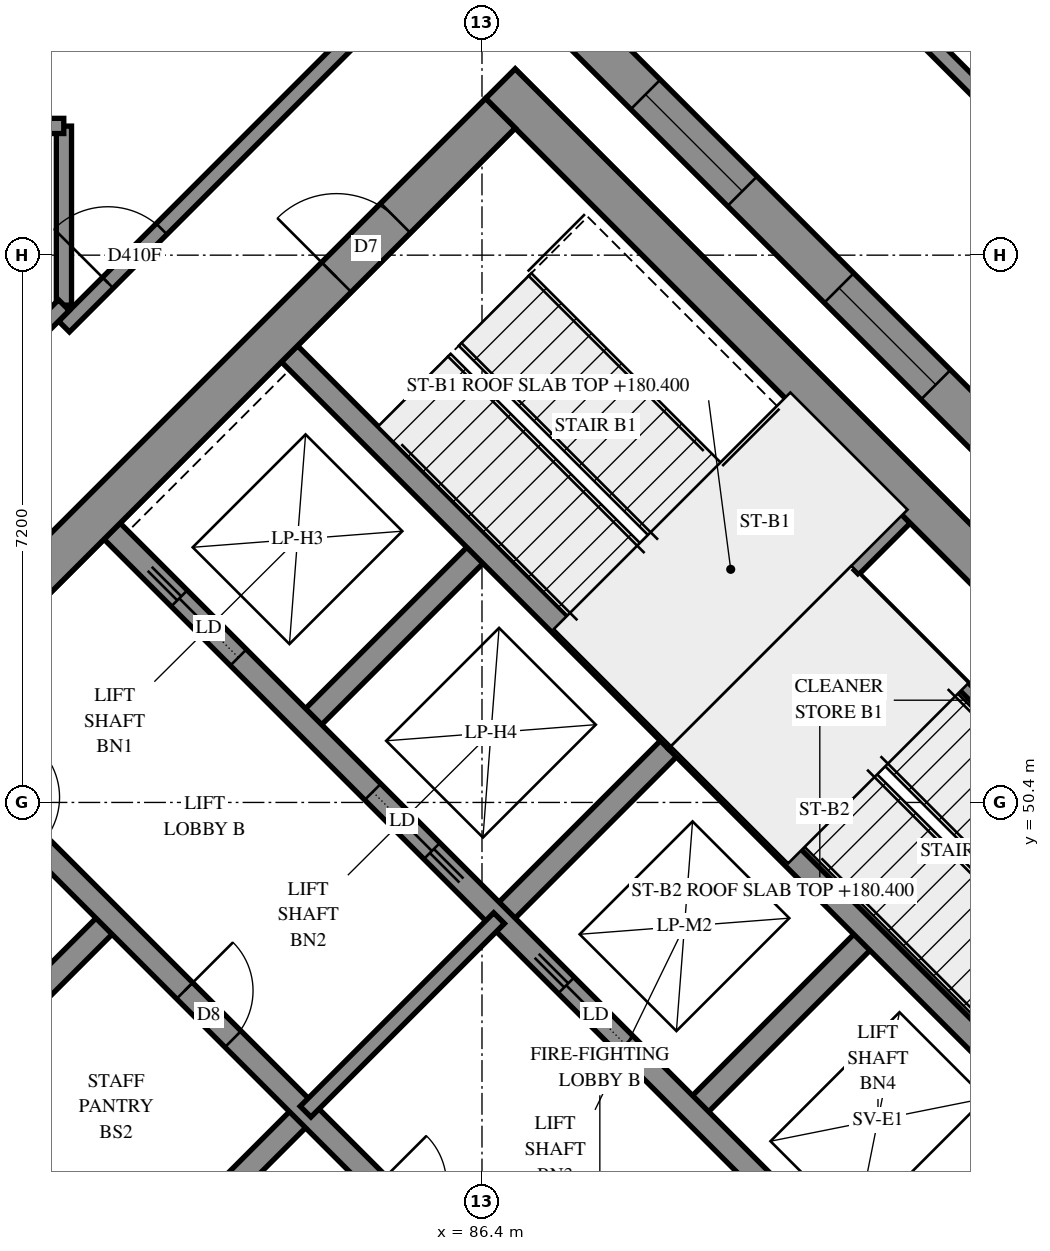
"""IFC4 building model, lengths in metres.
Left out: names, types, materials, properties, quantities, classifications, styles, units other than length and angle.
Written with IfcOpenShell. Run it as: python <this file> out.ifc"""

import sys

from ifc_helpers import new_model, si_unit, direction, frame, frame_2d, origin, place, context, subcontext, project, spatial, polyline, rectangle, outline, extrude, element, fill, save


model = new_model("IFC4")
c1 = context("Model", 3, precision=1e-05, world=origin(), true_north=direction((0.0, 1.0)))
c2 = subcontext(c1, "Body", "Model", "MODEL_VIEW")
j1 = project(units=[si_unit("LENGTHUNIT", "METRE"), si_unit("PLANEANGLEUNIT", "RADIAN")], contexts=[c1])
p1 = place(None, origin())
s1 = spatial("IfcSite", under=j1, at=p1, CompositionType="ELEMENT")
p2 = place(p1, origin())
s2 = spatial("IfcBuilding", under=s1, at=p2, CompositionType="ELEMENT")
p3 = place(p2, frame((0.0, 0.0, 180.4)))
s3 = spatial("IfcBuildingStorey", under=s2, at=p3, CompositionType="ELEMENT", Elevation=180.4)
p4 = place(p3, frame((76.071, 49.284, -0.3), z_axis=(0.0, 0.0, 1.0), x_axis=(0.7071035554, -0.707110007, 0.0)))
e1 = element("IfcWall", 1, at=p4, inside=s3, PredefinedType="SHEAR", context=c2, shape_type="SweptSolid", body=[
    extrude(rectangle(XDim=15.5, YDim=0.55, at=frame_2d((7.75, 0.0))), origin(), (0.0, 0.0, 1.0), 4.3),
])
p5 = place(p3, frame((86.642, 59.855, -0.3), z_axis=(0.0, 0.0, 1.0), x_axis=(0.707110007, -0.7071035554, 0.0)))
e2 = element("IfcWall", 2, at=p5, inside=s3, PredefinedType="SHEAR", context=c2, shape_type="SweptSolid", body=[
    extrude(rectangle(XDim=15.5, YDim=0.55, at=frame_2d((7.75, 0.0))), origin(), (0.0, 0.0, 1.0), 4.3),
])
p6 = place(p5, frame((10.55, 0.0, 0.3)))
e3 = element("IfcOpeningElement", 3, at=p6, cuts=e2, PredefinedType="OPENING", context=c2, shape_type="SweptSolid", body=[
    extrude(rectangle(XDim=0.8, YDim=2.1, at=frame_2d((0.4, 1.05))), frame((0.0, 0.285, 0.0), z_axis=(0.0, -1.0, 0.0), x_axis=(1.0, 0.0, 0.0)), (0.0, 0.0, 1.0), 0.57),
])
p7 = place(p3, frame((76.46, 49.284, -0.3), z_axis=(0.0, 0.0, 1.0), x_axis=(0.7071067812, 0.7071067812, 0.0)))
e4 = element("IfcWall", 4, at=p7, inside=s3, PredefinedType="SHEAR", context=c2, shape_type="SweptSolid", body=[
    extrude(rectangle(XDim=14.4, YDim=0.55, at=frame_2d((7.2, 0.0))), origin(), (0.0, 0.0, 1.0), 4.3),
])
p8 = place(p7, frame((4.55, 0.0, 0.3)))
e5 = element("IfcOpeningElement", 5, at=p8, cuts=e4, PredefinedType="OPENING", context=c2, shape_type="SweptSolid", body=[
    extrude(rectangle(XDim=1.1, YDim=2.1, at=frame_2d((0.55, 1.05))), frame((0.0, 0.285, 0.0), z_axis=(0.0, -1.0, 0.0), x_axis=(1.0, 0.0, 0.0)), (0.0, 0.0, 1.0), 0.57),
])
p9 = place(p7, frame((11.35, 0.0, 0.3)))
e6 = element("IfcOpeningElement", 6, at=p9, cuts=e4, PredefinedType="OPENING", context=c2, shape_type="SweptSolid", body=[
    extrude(rectangle(XDim=1.1, YDim=2.1, at=frame_2d((0.55, 1.05))), frame((0.0, 0.285, 0.0), z_axis=(0.0, -1.0, 0.0), x_axis=(1.0, 0.0, 0.0)), (0.0, 0.0, 1.0), 0.57),
])
p10 = place(p3, frame((87.031, 38.713, -0.3), z_axis=(0.0, 0.0, 1.0), x_axis=(0.707103309, 0.7071102534, 0.0)))
e7 = element("IfcWall", 7, at=p10, inside=s3, PredefinedType="SHEAR", context=c2, shape_type="SweptSolid", body=[
    extrude(rectangle(XDim=14.4, YDim=0.55, at=frame_2d((7.2, 0.0))), origin(), (0.0, 0.0, 1.0), 4.3),
])
p11 = place(p10, frame((4.55, 0.0, 0.3)))
e8 = element("IfcOpeningElement", 8, at=p11, cuts=e7, PredefinedType="OPENING", context=c2, shape_type="SweptSolid", body=[
    extrude(rectangle(XDim=1.1, YDim=2.1, at=frame_2d((0.55, 1.05))), frame((0.0, 0.285, 0.0), z_axis=(0.0, -1.0, 0.0), x_axis=(1.0, 0.0, 0.0)), (0.0, 0.0, 1.0), 0.57),
])
p12 = place(p10, frame((11.35, 0.0, 0.3)))
e9 = element("IfcOpeningElement", 9, at=p12, cuts=e7, PredefinedType="OPENING", context=c2, shape_type="SweptSolid", body=[
    extrude(rectangle(XDim=1.1, YDim=2.1, at=frame_2d((0.55, 1.05))), frame((0.0, 0.285, 0.0), z_axis=(0.0, -1.0, 0.0), x_axis=(1.0, 0.0, 0.0)), (0.0, 0.0, 1.0), 0.57),
])
for number, where, z_axis, x_axis in (
    (10, (79.2, 46.544, 0.0), (0.0, 0.0, 1.0), (0.707, 0.707, 0.0)),
    (11, (84.079, 51.423, 0.0), (0.0, 0.0, 1.0), (0.707, 0.707, 0.0)),
):
    element("IfcWall", number, at=place(p3, frame(where, z_axis=z_axis, x_axis=x_axis)), inside=s3, PredefinedType="SOLIDWALL", context=c2, shape_type="SweptSolid", body=[
        extrude(rectangle(XDim=3.3, YDim=0.3, at=frame_2d((1.65, 0.0))), origin(), (0.0, 0.0, 1.0), 4.7),
    ])
p13 = place(p3, frame((81.746, 43.999, 0.0), z_axis=(0.0, 0.0, 1.0), x_axis=(0.7071067812, 0.7071067812, 0.0)))
e12 = element("IfcWall", 12, at=p13, inside=s3, PredefinedType="SOLIDWALL", context=c2, shape_type="SweptSolid", body=[
    extrude(rectangle(XDim=3.3, YDim=0.3, at=frame_2d((1.65, 0.0))), origin(), (0.0, 0.0, 1.0), 4.7),
])
for number, where, z_axis, x_axis in (
    (13, (86.625, 48.878, 0.0), (0.0, 0.0, 1.0), (0.707, 0.707, 0.0)),
    (14, (89.17, 46.332, 0.0), (0.0, 0.0, 1.0), (0.707, 0.707, 0.0)),
):
    element("IfcWall", number, at=place(p3, frame(where, z_axis=z_axis, x_axis=x_axis)), inside=s3, PredefinedType="SOLIDWALL", context=c2, shape_type="SweptSolid", body=[
        extrude(rectangle(XDim=3.3, YDim=0.3, at=frame_2d((1.65, 0.0))), origin(), (0.0, 0.0, 1.0), 4.7),
    ])
p14 = place(p3, frame((78.988, 51.423, 0.0), z_axis=(0.0, 0.0, 1.0), x_axis=(0.7071067812, -0.7071067812, 0.0)))
e15 = element("IfcWall", 15, at=p14, inside=s3, PredefinedType="SOLIDWALL", context=c2, shape_type="SweptSolid", body=[
    extrude(rectangle(XDim=14.4, YDim=0.3, at=frame_2d((7.2, 0.0))), origin(), (0.0, 0.0, 1.0), 4.7),
])
p15 = place(p14, frame((1.35, 0.0, 0.0)))
e16 = element("IfcOpeningElement", 16, at=p15, cuts=e15, PredefinedType="OPENING", context=c2, shape_type="SweptSolid", body=[
    extrude(rectangle(XDim=0.9, YDim=2.1, at=frame_2d((0.45, 1.05))), frame((0.0, 0.16, 0.0), z_axis=(0.0, -1.0, 0.0), x_axis=(1.0, 0.0, 0.0)), (0.0, 0.0, 1.0), 0.32),
])
p16 = place(p14, frame((4.95, 0.0, 0.0)))
e17 = element("IfcOpeningElement", 17, at=p16, cuts=e15, PredefinedType="OPENING", context=c2, shape_type="SweptSolid", body=[
    extrude(rectangle(XDim=0.9, YDim=2.1, at=frame_2d((0.45, 1.05))), frame((0.0, 0.16, 0.0), z_axis=(0.0, -1.0, 0.0), x_axis=(1.0, 0.0, 0.0)), (0.0, 0.0, 1.0), 0.32),
])
p17 = place(p14, frame((8.55, 0.0, 0.0)))
e18 = element("IfcOpeningElement", 18, at=p17, cuts=e15, PredefinedType="OPENING", context=c2, shape_type="SweptSolid", body=[
    extrude(rectangle(XDim=0.9, YDim=2.1, at=frame_2d((0.45, 1.05))), frame((0.0, 0.16, 0.0), z_axis=(0.0, -1.0, 0.0), x_axis=(1.0, 0.0, 0.0)), (0.0, 0.0, 1.0), 0.32),
])
p18 = place(p14, frame((12.05, 0.0, 0.0)))
e19 = element("IfcOpeningElement", 19, at=p18, cuts=e15, PredefinedType="OPENING", context=c2, shape_type="SweptSolid", body=[
    extrude(rectangle(XDim=1.1, YDim=2.1, at=frame_2d((0.55, 1.05))), frame((0.0, 0.16, 0.0), z_axis=(0.0, -1.0, 0.0), x_axis=(1.0, 0.0, 0.0)), (0.0, 0.0, 1.0), 0.32),
])
p19 = place(p3, frame((81.534, 53.969, 0.0), z_axis=(0.0, 0.0, 1.0), x_axis=(0.707103309, -0.7071102534, 0.0)))
e20 = element("IfcWall", 20, at=p19, inside=s3, PredefinedType="SOLIDWALL", context=c2, shape_type="SweptSolid", body=[
    extrude(rectangle(XDim=14.4, YDim=0.3, at=frame_2d((7.2, 0.0))), origin(), (0.0, 0.0, 1.0), 4.7),
])
p20 = place(p19, frame((1.25, 0.0, 0.0)))
e21 = element("IfcOpeningElement", 21, at=p20, cuts=e20, PredefinedType="OPENING", context=c2, shape_type="SweptSolid", body=[
    extrude(rectangle(XDim=1.1, YDim=2.1, at=frame_2d((0.55, 1.05))), frame((0.0, 0.16, 0.0), z_axis=(0.0, -1.0, 0.0), x_axis=(1.0, 0.0, 0.0)), (0.0, 0.0, 1.0), 0.32),
])
p21 = place(p19, frame((4.85, 0.0, 0.0)))
e22 = element("IfcOpeningElement", 22, at=p21, cuts=e20, PredefinedType="OPENING", context=c2, shape_type="SweptSolid", body=[
    extrude(rectangle(XDim=1.1, YDim=2.1, at=frame_2d((0.55, 1.05))), frame((0.0, 0.16, 0.0), z_axis=(0.0, -1.0, 0.0), x_axis=(1.0, 0.0, 0.0)), (0.0, 0.0, 1.0), 0.32),
])
p22 = place(p19, frame((8.45, 0.0, 0.0)))
e23 = element("IfcOpeningElement", 23, at=p22, cuts=e20, PredefinedType="OPENING", context=c2, shape_type="SweptSolid", body=[
    extrude(rectangle(XDim=1.1, YDim=2.1, at=frame_2d((0.55, 1.05))), frame((0.0, 0.16, 0.0), z_axis=(0.0, -1.0, 0.0), x_axis=(1.0, 0.0, 0.0)), (0.0, 0.0, 1.0), 0.32),
])
p23 = place(p19, frame((12.05, 0.0, 0.0)))
e24 = element("IfcOpeningElement", 24, at=p23, cuts=e20, PredefinedType="OPENING", context=c2, shape_type="SweptSolid", body=[
    extrude(rectangle(XDim=1.1, YDim=2.1, at=frame_2d((0.55, 1.05))), frame((0.0, 0.16, 0.0), z_axis=(0.0, -1.0, 0.0), x_axis=(1.0, 0.0, 0.0)), (0.0, 0.0, 1.0), 0.32),
])
for number, where, z_axis, x_axis in (
    (25, (83.867, 56.302, 0.0), (0.0, 0.0, 1.0), (0.707, -0.707, 0.0)),
    (26, (88.958, 51.211, 0.0), (0.0, 0.0, 1.0), (0.707, -0.707, 0.0)),
):
    element("IfcWall", number, at=place(p3, frame(where, z_axis=z_axis, x_axis=x_axis)), inside=s3, PredefinedType="SOLIDWALL", context=c2, shape_type="SweptSolid", body=[
        extrude(rectangle(XDim=7.2, YDim=0.3, at=frame_2d((3.6, 0.0))), origin(), (0.0, 0.0, 1.0), 4.7),
    ])
p24 = place(p3, frame((88.958, 51.211, 0.0), z_axis=(0.0, 0.0, 1.0), x_axis=(0.7071067812, 0.7071067812, 0.0)))
e27 = element("IfcWall", 27, at=p24, inside=s3, PredefinedType="SOLIDWALL", context=c2, shape_type="SweptSolid", body=[
    extrude(rectangle(XDim=4.2, YDim=0.3, at=frame_2d((2.1, 0.0))), origin(), (0.0, 0.0, 1.0), 4.7),
])
p25 = place(p3, frame((100.024, 48.241, 0.0), z_axis=(0.0, 0.0, 1.0), x_axis=(-0.7071067812, 0.7071067812, 0.0)))
e28 = element("IfcWall", 28, at=p25, inside=s3, PredefinedType="SOLIDWALL", context=c2, shape_type="SweptSolid", body=[
    extrude(outline(polyline([(-0.275, -0.275), (30.779, -0.275), (30.552, 0.275), (0.275, 0.275), (-0.275, -0.275)])), origin(), (0.0, 0.0, 1.0), 4.7),
])
p26 = place(p25, frame((3.625, 0.0, 0.9)))
e29 = element("IfcOpeningElement", 29, at=p26, cuts=e28, PredefinedType="OPENING", context=c2, shape_type="SweptSolid", body=[
    extrude(rectangle(XDim=1.8, YDim=3.6, at=frame_2d((0.9, 1.8))), frame((0.0, 0.285, 0.0), z_axis=(0.0, -1.0, 0.0), x_axis=(1.0, 0.0, 0.0)), (0.0, 0.0, 1.0), 0.57),
])
p27 = place(p25, frame((7.225, 0.0, 0.9)))
e30 = element("IfcOpeningElement", 30, at=p27, cuts=e28, PredefinedType="OPENING", context=c2, shape_type="SweptSolid", body=[
    extrude(rectangle(XDim=1.8, YDim=3.6, at=frame_2d((0.9, 1.8))), frame((0.0, 0.285, 0.0), z_axis=(0.0, -1.0, 0.0), x_axis=(1.0, 0.0, 0.0)), (0.0, 0.0, 1.0), 0.57),
])
p28 = place(p25, frame((10.825, 0.0, 0.9)))
e31 = element("IfcOpeningElement", 31, at=p28, cuts=e28, PredefinedType="OPENING", context=c2, shape_type="SweptSolid", body=[
    extrude(rectangle(XDim=1.8, YDim=3.6, at=frame_2d((0.9, 1.8))), frame((0.0, 0.285, 0.0), z_axis=(0.0, -1.0, 0.0), x_axis=(1.0, 0.0, 0.0)), (0.0, 0.0, 1.0), 0.57),
])
p29 = place(p25, frame((14.425, 0.0, 0.9)))
e32 = element("IfcOpeningElement", 32, at=p29, cuts=e28, PredefinedType="OPENING", context=c2, shape_type="SweptSolid", body=[
    extrude(rectangle(XDim=1.8, YDim=3.6, at=frame_2d((0.9, 1.8))), frame((0.0, 0.285, 0.0), z_axis=(0.0, -1.0, 0.0), x_axis=(1.0, 0.0, 0.0)), (0.0, 0.0, 1.0), 0.57),
])
p30 = place(p25, frame((17.575, 0.0, 0.9)))
e33 = element("IfcOpeningElement", 33, at=p30, cuts=e28, PredefinedType="OPENING", context=c2, shape_type="SweptSolid", body=[
    extrude(rectangle(XDim=1.8, YDim=3.6, at=frame_2d((0.9, 1.8))), frame((0.0, 0.285, 0.0), z_axis=(0.0, -1.0, 0.0), x_axis=(1.0, 0.0, 0.0)), (0.0, 0.0, 1.0), 0.57),
])
p31 = place(p25, frame((21.625, 0.0, 0.9)))
e34 = element("IfcOpeningElement", 34, at=p31, cuts=e28, PredefinedType="OPENING", context=c2, shape_type="SweptSolid", body=[
    extrude(rectangle(XDim=1.8, YDim=3.6, at=frame_2d((0.9, 1.8))), frame((0.0, 0.285, 0.0), z_axis=(0.0, -1.0, 0.0), x_axis=(1.0, 0.0, 0.0)), (0.0, 0.0, 1.0), 0.57),
])
p32 = place(p25, frame((25.225, 0.0, 0.9)))
e35 = element("IfcOpeningElement", 35, at=p32, cuts=e28, PredefinedType="OPENING", context=c2, shape_type="SweptSolid", body=[
    extrude(rectangle(XDim=1.8, YDim=3.6, at=frame_2d((0.9, 1.8))), frame((0.0, 0.285, 0.0), z_axis=(0.0, -1.0, 0.0), x_axis=(1.0, 0.0, 0.0)), (0.0, 0.0, 1.0), 0.57),
])
p33 = place(p25, frame((28.438, 0.0, 0.9)))
e36 = element("IfcOpeningElement", 36, at=p33, cuts=e28, PredefinedType="OPENING", context=c2, shape_type="SweptSolid", body=[
    extrude(rectangle(XDim=1.8, YDim=3.6, at=frame_2d((0.9, 1.8))), frame((0.0, 0.285, 0.0), z_axis=(0.0, -1.0, 0.0), x_axis=(1.0, 0.0, 0.0)), (0.0, 0.0, 1.0), 0.57),
])
p34 = place(p3, frame((78.312, 45.275, 0.0), z_axis=(0.0, 0.0, 1.0), x_axis=(0.7071035873, -0.707109975, 0.0)))
e37 = element("IfcWall", 37, at=p34, inside=s3, PredefinedType="SOLIDWALL", context=c2, shape_type="SweptSolid", body=[
    extrude(outline(polyline([(0.114, -0.275), (15.93, -0.275), (15.38, 0.275), (-0.114, 0.275), (0.114, -0.275)])), origin(), (0.0, 0.0, 1.0), 4.7),
])
p35 = place(p34, frame((4.23, 0.0, 0.9)))
e38 = element("IfcOpeningElement", 38, at=p35, cuts=e37, PredefinedType="OPENING", context=c2, shape_type="SweptSolid", body=[
    extrude(rectangle(XDim=1.8, YDim=3.6, at=frame_2d((0.9, 1.8))), frame((0.0, 0.285, 0.0), z_axis=(0.0, -1.0, 0.0), x_axis=(1.0, 0.0, 0.0)), (0.0, 0.0, 1.0), 0.57),
])
p36 = place(p34, frame((7.83, 0.0, 0.9)))
e39 = element("IfcOpeningElement", 39, at=p36, cuts=e37, PredefinedType="OPENING", context=c2, shape_type="SweptSolid", body=[
    extrude(rectangle(XDim=1.8, YDim=3.6, at=frame_2d((0.9, 1.8))), frame((0.0, 0.285, 0.0), z_axis=(0.0, -1.0, 0.0), x_axis=(1.0, 0.0, 0.0)), (0.0, 0.0, 1.0), 0.57),
])
p37 = place(p34, frame((10.53, 0.0, 0.9)))
e40 = element("IfcOpeningElement", 40, at=p37, cuts=e37, PredefinedType="OPENING", context=c2, shape_type="SweptSolid", body=[
    extrude(rectangle(XDim=1.8, YDim=3.6, at=frame_2d((0.9, 1.8))), frame((0.0, 0.285, 0.0), z_axis=(0.0, -1.0, 0.0), x_axis=(1.0, 0.0, 0.0)), (0.0, 0.0, 1.0), 0.57),
])
p38 = place(p3, frame((102.747, 49.938, 0.0), z_axis=(0.0, 0.0, 1.0), x_axis=(-0.7071083109, 0.7071052514, 0.0)))
e41 = element("IfcWall", 41, at=p38, inside=s3, PredefinedType="SOLIDWALL", context=c2, shape_type="SweptSolid", body=[
    extrude(outline(polyline([(-0.1, -0.1), (32.726, -0.1), (32.644, 0.1), (0.1, 0.1), (-0.1, -0.1)])), origin(), (0.0, 0.0, 1.0), 4.7),
])
p39 = place(p3, frame((91.313, 53.354, 0.0), z_axis=(0.0, 0.0, 1.0), x_axis=(0.7071067812, -0.7071067812, 0.0)))
e42 = element("IfcWall", 42, at=p39, inside=s3, PredefinedType="PARTITIONING", context=c2, shape_type="SweptSolid", body=[
    extrude(rectangle(XDim=5.65, YDim=0.15, at=frame_2d((2.825, 0.0))), origin(), (0.0, 0.0, 1.0), 4.7),
])
p40 = place(p3, frame((84.079, 46.332, 0.0), z_axis=(0.0, 0.0, 1.0), x_axis=(0.7071067812, 0.7071067812, 0.0)))
e43 = element("IfcWall", 43, at=p40, inside=s3, PredefinedType="PARTITIONING", context=c2, shape_type="SweptSolid", body=[
    extrude(rectangle(XDim=3.6, YDim=0.2, at=frame_2d((1.8, 0.0))), origin(), (0.0, 0.0, 1.0), 4.7),
])
p41 = place(p3, frame((80.901, 56.66, 0.0), z_axis=(0.0, 0.0, 1.0), x_axis=(0.7069628018, 0.7072507313, 0.0)))
e44 = element("IfcWall", 44, at=p41, inside=s3, PredefinedType="PARTITIONING", context=c2, shape_type="SweptSolid", body=[
    extrude(rectangle(XDim=7.293, YDim=0.2, at=frame_2d((3.647, 0.0))), origin(), (0.0, 0.0, 1.0), 4.7),
])
p42 = place(p41, frame((0.815, 0.0, 0.0)))
e45 = element("IfcOpeningElement", 45, at=p42, cuts=e44, PredefinedType="OPENING", context=c2, shape_type="SweptSolid", body=[
    extrude(rectangle(XDim=1.0, YDim=2.1, at=frame_2d((0.5, 1.05))), frame((0.0, 0.11, 0.0), z_axis=(0.0, -1.0, 0.0), x_axis=(1.0, 0.0, 0.0)), (0.0, 0.0, 1.0), 0.22),
])
p43 = place(p3, frame((80.9, 56.942, 0.0), z_axis=(0.0, 0.0, 1.0), x_axis=(0.0, 1.0, 0.0)))
e46 = element("IfcWall", 46, at=p43, inside=s3, PredefinedType="PARTITIONING", context=c2, shape_type="SweptSolid", body=[
    extrude(rectangle(XDim=2.356, YDim=0.2, at=frame_2d((1.178, 0.0))), origin(), (0.0, 0.0, 1.0), 4.7),
])
p44 = place(p3, frame((79.801, 55.845, 0.0), z_axis=(0.0, 0.0, 1.0), x_axis=(0.7071067812, 0.7071067812, 0.0)))
e47 = element("IfcWall", 47, at=p44, inside=s3, PredefinedType="PARTITIONING", context=c2, shape_type="SweptSolid", body=[
    extrude(rectangle(XDim=1.553, YDim=0.2, at=frame_2d((0.776, 0.0))), origin(), (0.0, 0.0, 1.0), 4.7),
])
p45 = place(p3, frame((79.8, 59.3, 0.0), z_axis=(0.0, 0.0, 1.0), x_axis=(1.0, 0.0, 0.0)))
e48 = element("IfcWall", 48, at=p45, inside=s3, PredefinedType="PARTITIONING", context=c2, shape_type="SweptSolid", body=[
    extrude(rectangle(XDim=1.098, YDim=0.2, at=frame_2d((0.549, 0.0))), origin(), (0.0, 0.0, 1.0), 4.7),
])
p46 = place(p28, origin())
e49 = element("IfcWindow", 49, at=p46, inside=s3, PartitioningType="SINGLE_PANEL", PredefinedType="WINDOW", context=c2, shape_type="SweptSolid", body=[
    extrude(rectangle(XDim=1.8, YDim=3.6, at=frame_2d((0.9, 1.8))), frame((0.0, 0.155, 0.0), z_axis=(0.0, -1.0, 0.0), x_axis=(1.0, 0.0, 0.0)), (0.0, 0.0, 1.0), 0.06),
])
fill(e31, e49)
p47 = place(p29, origin())
e50 = element("IfcWindow", 50, at=p47, inside=s3, PartitioningType="SINGLE_PANEL", PredefinedType="WINDOW", context=c2, shape_type="SweptSolid", body=[
    extrude(rectangle(XDim=1.8, YDim=3.6, at=frame_2d((0.9, 1.8))), frame((0.0, 0.155, 0.0), z_axis=(0.0, -1.0, 0.0), x_axis=(1.0, 0.0, 0.0)), (0.0, 0.0, 1.0), 0.06),
])
fill(e32, e50)
p48 = place(p9, origin())
e51 = element("IfcDoor", 51, at=p48, inside=s3, OperationType="SINGLE_SWING_LEFT", PredefinedType="DOOR", context=c2, shape_type="SweptSolid", body=[
    extrude(rectangle(XDim=1.1, YDim=2.1, at=frame_2d((0.55, 1.05))), frame((0.0, 0.025, 0.0), z_axis=(0.0, -1.0, 0.0), x_axis=(1.0, 0.0, 0.0)), (0.0, 0.0, 1.0), 0.05),
])
fill(e6, e51)
p49 = place(p16, origin())
e52 = element("IfcDoor", 52, at=p49, inside=s3, OperationType="SINGLE_SWING_LEFT", PredefinedType="DOOR", context=c2, shape_type="SweptSolid", body=[
    extrude(rectangle(XDim=0.9, YDim=2.1, at=frame_2d((0.45, 1.05))), frame((0.0, 0.025, 0.0), z_axis=(0.0, -1.0, 0.0), x_axis=(1.0, 0.0, 0.0)), (0.0, 0.0, 1.0), 0.05),
])
fill(e17, e52)
p50 = place(p20, origin())
e53 = element("IfcDoor", 53, at=p50, inside=s3, OperationType="SLIDING_TO_LEFT", PredefinedType="DOOR", context=c2, shape_type="SweptSolid", body=[
    extrude(rectangle(XDim=1.1, YDim=2.1, at=frame_2d((0.55, 1.05))), frame((0.0, 0.025, 0.0), z_axis=(0.0, -1.0, 0.0), x_axis=(1.0, 0.0, 0.0)), (0.0, 0.0, 1.0), 0.05),
])
fill(e21, e53)
p51 = place(p21, origin())
e54 = element("IfcDoor", 54, at=p51, inside=s3, OperationType="SLIDING_TO_RIGHT", PredefinedType="DOOR", context=c2, shape_type="SweptSolid", body=[
    extrude(rectangle(XDim=1.1, YDim=2.1, at=frame_2d((0.55, 1.05))), frame((0.0, 0.025, 0.0), z_axis=(0.0, -1.0, 0.0), x_axis=(1.0, 0.0, 0.0)), (0.0, 0.0, 1.0), 0.05),
])
fill(e22, e54)
p52 = place(p22, origin())
e55 = element("IfcDoor", 55, at=p52, inside=s3, OperationType="SLIDING_TO_LEFT", PredefinedType="DOOR", context=c2, shape_type="SweptSolid", body=[
    extrude(rectangle(XDim=1.1, YDim=2.1, at=frame_2d((0.55, 1.05))), frame((0.0, 0.025, 0.0), z_axis=(0.0, -1.0, 0.0), x_axis=(1.0, 0.0, 0.0)), (0.0, 0.0, 1.0), 0.05),
])
fill(e23, e55)
p53 = place(p42, origin())
e56 = element("IfcDoor", 56, at=p53, inside=s3, OperationType="SINGLE_SWING_RIGHT", PredefinedType="DOOR", context=c2, shape_type="SweptSolid", body=[
    extrude(rectangle(XDim=1.0, YDim=2.1, at=frame_2d((0.5, 1.05))), frame((0.0, 0.025, 0.0), z_axis=(0.0, -1.0, 0.0), x_axis=(1.0, 0.0, 0.0)), (0.0, 0.0, 1.0), 0.05),
])
fill(e45, e56)
save(model, sys.argv[1])
